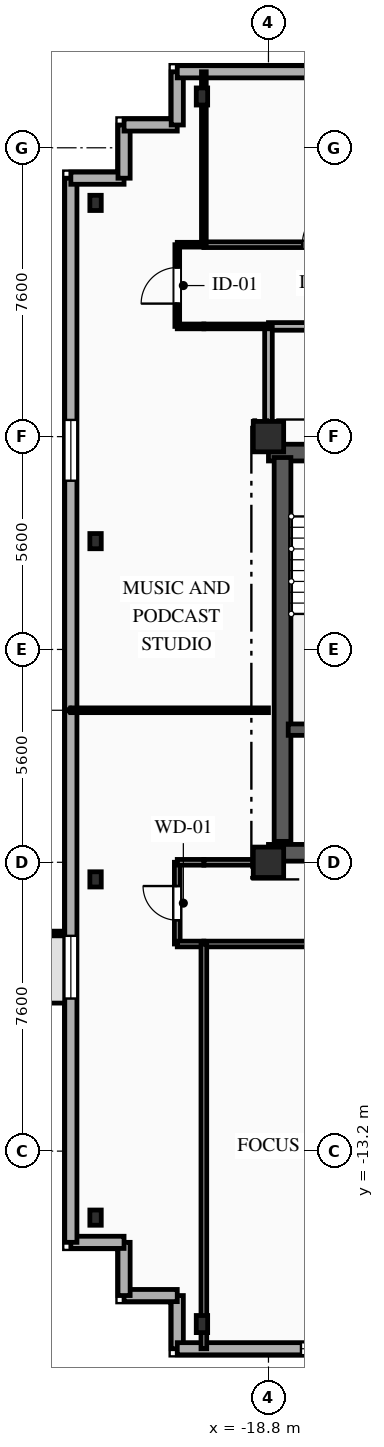
"""IFC4 building model, lengths in metres.
Left out: names, types, materials, properties, quantities, classifications, styles, units other than length and angle.
Written with IfcOpenShell. Run it as: python <this file> out.ifc"""

import sys

from ifc_helpers import new_model, si_unit, direction, frame, frame_2d, origin, origin_2d, place, context, subcontext, project, spatial, rectangle, i_section, extrude, element, fill, save


model = new_model("IFC4")
c1 = context("Model", 3, precision=1e-05, world=origin(), true_north=direction((0.0, 1.0)))
c2 = subcontext(c1, "Body", "Model", "MODEL_VIEW")
j1 = project(units=[si_unit("LENGTHUNIT", "METRE"), si_unit("PLANEANGLEUNIT", "RADIAN")], contexts=[c1])
p1 = place(None, origin())
s1 = spatial("IfcSite", under=j1, at=p1, CompositionType="ELEMENT")
p2 = place(p1, origin())
s2 = spatial("IfcBuilding", under=s1, at=p2, CompositionType="ELEMENT")
p3 = place(p2, frame((0.0, 0.0, 231.65)))
s3 = spatial("IfcBuildingStorey", under=s2, at=p3, CompositionType="ELEMENT", Elevation=231.65)
for number, where, z_axis, x_axis in (
    (1, (-18.8, -5.6, 0.0), (0.0, 0.0, 1.0), (1.0, 0.0, 0.0)),
    (2, (-18.8, 5.6, 0.0), (0.0, 0.0, 1.0), (1.0, 0.0, 0.0)),
):
    element("IfcColumn", number, at=place(p3, frame(where, z_axis=z_axis, x_axis=x_axis)), inside=s3, PredefinedType="COLUMN", context=c2, shape_type="SweptSolid", body=[
        extrude(rectangle(XDim=0.8, YDim=0.8, at=origin_2d()), origin(), (0.0, 0.0, 1.0), 3.35),
    ])
for number, where, z_axis, x_axis in (
    (3, (-20.55, -17.75, 0.0), (0.0, 0.0, 1.0), (1.0, 0.0, 0.0)),
    (4, (-20.55, 14.55, 0.0), (0.0, 0.0, 1.0), (1.0, 0.0, 0.0)),
):
    element("IfcColumn", number, at=place(p3, frame(where, z_axis=z_axis, x_axis=x_axis)), inside=s3, PredefinedType="COLUMN", context=c2, shape_type="SweptSolid", body=[
        extrude(i_section(OverallWidth=0.3, OverallDepth=0.45, WebThickness=0.014, FlangeThickness=0.026, FilletRadius=0.027, at=origin_2d()), origin(), (0.0, 0.0, 1.0), 3.35),
    ])
for number, where, z_axis, x_axis in (
    (5, (-23.35, 11.75, 0.0), (0.0, 0.0, 1.0), (1.0, 0.0, 0.0)),
    (6, (-23.35, 2.85, 0.0), (0.0, 0.0, 1.0), (1.0, 0.0, 0.0)),
    (7, (-23.35, -6.05, 0.0), (0.0, 0.0, 1.0), (1.0, 0.0, 0.0)),
    (8, (-23.35, -14.95, 0.0), (0.0, 0.0, 1.0), (1.0, 0.0, 0.0)),
):
    element("IfcColumn", number, at=place(p3, frame(where, z_axis=z_axis, x_axis=x_axis)), inside=s3, PredefinedType="COLUMN", context=c2, shape_type="SweptSolid", body=[
        extrude(i_section(OverallWidth=0.3, OverallDepth=0.4, WebThickness=0.013, FlangeThickness=0.024, FilletRadius=0.027, at=origin_2d()), origin(), (0.0, 0.0, 1.0), 3.35),
    ])
p4 = place(p3, frame((-21.2, -18.4, 0.0), z_axis=(0.0, 0.0, 1.0), x_axis=(0.0, 1.0, 0.0)))
e9 = element("IfcWall", 9, at=p4, inside=s3, PredefinedType="SOLIDWALL", context=c2, shape_type="SweptSolid", body=[
    extrude(rectangle(XDim=1.4, YDim=0.32, at=frame_2d((0.7, 0.0))), origin(), (0.0, 0.0, 1.0), 3.04),
])
p5 = place(p3, frame((-21.2, -17.0, 0.0), z_axis=(0.0, 0.0, 1.0), x_axis=(-1.0, 0.0, 0.0)))
e10 = element("IfcWall", 10, at=p5, inside=s3, PredefinedType="SOLIDWALL", context=c2, shape_type="SweptSolid", body=[
    extrude(rectangle(XDim=1.4, YDim=0.32, at=frame_2d((0.7, 0.0))), origin(), (0.0, 0.0, 1.0), 3.04),
])
for number, where, z_axis, x_axis in (
    (11, (-22.6, -17.0, 0.0), (0.0, 0.0, 1.0), (0.0, 1.0, 0.0)),
    (12, (-22.6, -15.6, 0.0), (0.0, 0.0, 1.0), (-1.0, 0.0, 0.0)),
):
    element("IfcWall", number, at=place(p3, frame(where, z_axis=z_axis, x_axis=x_axis)), inside=s3, PredefinedType="SOLIDWALL", context=c2, shape_type="SweptSolid", body=[
        extrude(rectangle(XDim=1.4, YDim=0.32, at=frame_2d((0.7, 0.0))), origin(), (0.0, 0.0, 1.0), 3.04),
    ])
p6 = place(p3, frame((-24.0, -15.6, 0.0), z_axis=(0.0, 0.0, 1.0), x_axis=(0.0, 1.0, 0.0)))
e13 = element("IfcWall", 13, at=p6, inside=s3, PredefinedType="SOLIDWALL", context=c2, shape_type="SweptSolid", body=[
    extrude(rectangle(XDim=28.0, YDim=0.32, at=frame_2d((14.0, 0.0))), origin(), (0.0, 0.0, 1.0), 3.04),
])
p7 = place(p6, frame((6.415, 0.0, 0.85)))
e14 = element("IfcOpeningElement", 14, at=p7, cuts=e13, PredefinedType="OPENING", context=c2, shape_type="SweptSolid", body=[
    extrude(rectangle(XDim=1.65, YDim=1.85, at=frame_2d((0.825, 0.925))), frame((0.0, 0.17, 0.0), z_axis=(0.0, -1.0, 0.0), x_axis=(1.0, 0.0, 0.0)), (0.0, 0.0, 1.0), 0.34),
])
p8 = place(p6, frame((20.04, 0.0, 0.85)))
e15 = element("IfcOpeningElement", 15, at=p8, cuts=e13, PredefinedType="OPENING", context=c2, shape_type="SweptSolid", body=[
    extrude(rectangle(XDim=1.6, YDim=1.85, at=frame_2d((0.8, 0.925))), frame((0.0, 0.17, 0.0), z_axis=(0.0, -1.0, 0.0), x_axis=(1.0, 0.0, 0.0)), (0.0, 0.0, 1.0), 0.34),
])
p9 = place(p3, frame((-24.0, 12.4, 0.0), z_axis=(0.0, 0.0, 1.0), x_axis=(1.0, 0.0, 0.0)))
e16 = element("IfcWall", 16, at=p9, inside=s3, PredefinedType="SOLIDWALL", context=c2, shape_type="SweptSolid", body=[
    extrude(rectangle(XDim=1.4, YDim=0.32, at=frame_2d((0.7, 0.0))), origin(), (0.0, 0.0, 1.0), 3.04),
])
for number, where, z_axis, x_axis in (
    (17, (-22.6, 12.4, 0.0), (0.0, 0.0, 1.0), (0.0, 1.0, 0.0)),
    (18, (-22.6, 13.8, 0.0), (0.0, 0.0, 1.0), (1.0, 0.0, 0.0)),
):
    element("IfcWall", number, at=place(p3, frame(where, z_axis=z_axis, x_axis=x_axis)), inside=s3, PredefinedType="SOLIDWALL", context=c2, shape_type="SweptSolid", body=[
        extrude(rectangle(XDim=1.4, YDim=0.32, at=frame_2d((0.7, 0.0))), origin(), (0.0, 0.0, 1.0), 3.04),
    ])
p10 = place(p3, frame((-21.2, 13.8, 0.0), z_axis=(0.0, 0.0, 1.0), x_axis=(0.0, 1.0, 0.0)))
e19 = element("IfcWall", 19, at=p10, inside=s3, PredefinedType="SOLIDWALL", context=c2, shape_type="SweptSolid", body=[
    extrude(rectangle(XDim=1.4, YDim=0.32, at=frame_2d((0.7, 0.0))), origin(), (0.0, 0.0, 1.0), 3.04),
])
p11 = place(p3, frame((-21.2, 15.2, 0.0), z_axis=(0.0, 0.0, 1.0), x_axis=(1.0, 0.0, 0.0)))
e20 = element("IfcWall", 20, at=p11, inside=s3, PredefinedType="SOLIDWALL", context=c2, shape_type="SweptSolid", body=[
    extrude(rectangle(XDim=42.0, YDim=0.32, at=frame_2d((21.0, 0.0))), origin(), (0.0, 0.0, 1.0), 3.04),
])
p12 = place(p11, frame((5.015, 0.0, 0.85)))
e21 = element("IfcOpeningElement", 21, at=p12, cuts=e20, PredefinedType="OPENING", context=c2, shape_type="SweptSolid", body=[
    extrude(rectangle(XDim=1.65, YDim=1.85, at=frame_2d((0.825, 0.925))), frame((0.0, 0.17, 0.0), z_axis=(0.0, -1.0, 0.0), x_axis=(1.0, 0.0, 0.0)), (0.0, 0.0, 1.0), 0.34),
])
p13 = place(p11, frame((16.48, 0.0, 0.85)))
e22 = element("IfcOpeningElement", 22, at=p13, cuts=e20, PredefinedType="OPENING", context=c2, shape_type="SweptSolid", body=[
    extrude(rectangle(XDim=1.6, YDim=1.85, at=frame_2d((0.8, 0.925))), frame((0.0, 0.17, 0.0), z_axis=(0.0, -1.0, 0.0), x_axis=(1.0, 0.0, 0.0)), (0.0, 0.0, 1.0), 0.34),
])
p14 = place(p11, frame((25.575, 0.0, 0.85)))
e23 = element("IfcOpeningElement", 23, at=p14, cuts=e20, PredefinedType="OPENING", context=c2, shape_type="SweptSolid", body=[
    extrude(rectangle(XDim=1.65, YDim=1.85, at=frame_2d((0.825, 0.925))), frame((0.0, 0.17, 0.0), z_axis=(0.0, -1.0, 0.0), x_axis=(1.0, 0.0, 0.0)), (0.0, 0.0, 1.0), 0.34),
])
p15 = place(p11, frame((35.735, 0.0, 0.85)))
e24 = element("IfcOpeningElement", 24, at=p15, cuts=e20, PredefinedType="OPENING", context=c2, shape_type="SweptSolid", body=[
    extrude(rectangle(XDim=1.65, YDim=1.85, at=frame_2d((0.825, 0.925))), frame((0.0, 0.17, 0.0), z_axis=(0.0, -1.0, 0.0), x_axis=(1.0, 0.0, 0.0)), (0.0, 0.0, 1.0), 0.34),
])
p16 = place(p3, frame((20.8, -18.4, 0.0), z_axis=(0.0, 0.0, 1.0), x_axis=(-1.0, 0.0, 0.0)))
e25 = element("IfcWall", 25, at=p16, inside=s3, PredefinedType="SOLIDWALL", context=c2, shape_type="SweptSolid", body=[
    extrude(rectangle(XDim=42.0, YDim=0.32, at=frame_2d((21.0, 0.0))), origin(), (0.0, 0.0, 1.0), 3.04),
])
p17 = place(p16, frame((3.015, 0.0, 0.85)))
e26 = element("IfcOpeningElement", 26, at=p17, cuts=e25, PredefinedType="OPENING", context=c2, shape_type="SweptSolid", body=[
    extrude(rectangle(XDim=1.65, YDim=1.85, at=frame_2d((0.825, 0.925))), frame((0.0, 0.17, 0.0), z_axis=(0.0, -1.0, 0.0), x_axis=(1.0, 0.0, 0.0)), (0.0, 0.0, 1.0), 0.34),
])
p18 = place(p16, frame((9.775, 0.0, 0.85)))
e27 = element("IfcOpeningElement", 27, at=p18, cuts=e25, PredefinedType="OPENING", context=c2, shape_type="SweptSolid", body=[
    extrude(rectangle(XDim=1.65, YDim=1.85, at=frame_2d((0.825, 0.925))), frame((0.0, 0.17, 0.0), z_axis=(0.0, -1.0, 0.0), x_axis=(1.0, 0.0, 0.0)), (0.0, 0.0, 1.0), 0.34),
])
p19 = place(p16, frame((19.74, 0.0, 0.85)))
e28 = element("IfcOpeningElement", 28, at=p19, cuts=e25, PredefinedType="OPENING", context=c2, shape_type="SweptSolid", body=[
    extrude(rectangle(XDim=2.2, YDim=1.85, at=frame_2d((1.1, 0.925))), frame((0.0, 0.17, 0.0), z_axis=(0.0, -1.0, 0.0), x_axis=(1.0, 0.0, 0.0)), (0.0, 0.0, 1.0), 0.34),
])
p20 = place(p16, frame((30.255, 0.0, 0.85)))
e29 = element("IfcOpeningElement", 29, at=p20, cuts=e25, PredefinedType="OPENING", context=c2, shape_type="SweptSolid", body=[
    extrude(rectangle(XDim=1.65, YDim=1.85, at=frame_2d((0.825, 0.925))), frame((0.0, 0.17, 0.0), z_axis=(0.0, -1.0, 0.0), x_axis=(1.0, 0.0, 0.0)), (0.0, 0.0, 1.0), 0.34),
])
p21 = place(p16, frame((37.095, 0.0, 0.85)))
e30 = element("IfcOpeningElement", 30, at=p21, cuts=e25, PredefinedType="OPENING", context=c2, shape_type="SweptSolid", body=[
    extrude(rectangle(XDim=1.65, YDim=1.85, at=frame_2d((0.825, 0.925))), frame((0.0, 0.17, 0.0), z_axis=(0.0, -1.0, 0.0), x_axis=(1.0, 0.0, 0.0)), (0.0, 0.0, 1.0), 0.34),
])
p22 = place(p3, frame((-18.8, 5.18, 0.0), z_axis=(0.0, 0.0, 1.0), x_axis=(1.0, 0.0, 0.0)))
e31 = element("IfcWall", 31, at=p22, inside=s3, PredefinedType="SHEAR", context=c2, shape_type="SweptSolid", body=[
    extrude(rectangle(XDim=9.6, YDim=0.44, at=frame_2d((4.8, 0.0))), origin(), (0.0, 0.0, 1.0), 3.04),
])
p23 = place(p22, frame((1.55, 0.0, 0.0)))
e32 = element("IfcOpeningElement", 32, at=p23, cuts=e31, PredefinedType="OPENING", context=c2, shape_type="SweptSolid", body=[
    extrude(rectangle(XDim=1.1, YDim=2.15, at=frame_2d((0.55, 1.075))), frame((0.0, 0.23, 0.0), z_axis=(0.0, -1.0, 0.0), x_axis=(1.0, 0.0, 0.0)), (0.0, 0.0, 1.0), 0.46),
])
p24 = place(p22, frame((4.775, 0.0, 0.0)))
e33 = element("IfcOpeningElement", 33, at=p24, cuts=e31, PredefinedType="OPENING", context=c2, shape_type="SweptSolid", body=[
    extrude(rectangle(XDim=1.05, YDim=2.1, at=frame_2d((0.525, 1.05))), frame((0.0, 0.23, 0.0), z_axis=(0.0, -1.0, 0.0), x_axis=(1.0, 0.0, 0.0)), (0.0, 0.0, 1.0), 0.46),
])
p25 = place(p3, frame((-18.8, -5.35, 0.0), z_axis=(0.0, 0.0, 1.0), x_axis=(1.0, 0.0, 0.0)))
e34 = element("IfcWall", 34, at=p25, inside=s3, PredefinedType="SHEAR", context=c2, shape_type="SweptSolid", body=[
    extrude(rectangle(XDim=9.6, YDim=0.44, at=frame_2d((4.8, 0.0))), origin(), (0.0, 0.0, 1.0), 3.04),
])
p26 = place(p25, frame((1.05, 0.0, 0.0)))
e35 = element("IfcOpeningElement", 35, at=p26, cuts=e34, PredefinedType="OPENING", context=c2, shape_type="SweptSolid", body=[
    extrude(rectangle(XDim=0.9, YDim=2.1, at=frame_2d((0.45, 1.05))), frame((0.0, 0.23, 0.0), z_axis=(0.0, -1.0, 0.0), x_axis=(1.0, 0.0, 0.0)), (0.0, 0.0, 1.0), 0.46),
])
p27 = place(p3, frame((-18.43, -5.05, 0.0), z_axis=(0.0, 0.0, 1.0), x_axis=(0.0, 1.0, 0.0)))
e36 = element("IfcWall", 36, at=p27, inside=s3, PredefinedType="SHEAR", context=c2, shape_type="SweptSolid", body=[
    extrude(rectangle(XDim=10.1, YDim=0.44, at=frame_2d((5.05, 0.0))), origin(), (0.0, 0.0, 1.0), 3.04),
])
p28 = place(p3, frame((-18.28, -2.11, 0.0), z_axis=(0.0, 0.0, 1.0), x_axis=(1.0, 0.0, 0.0)))
e37 = element("IfcWall", 37, at=p28, inside=s3, PredefinedType="SHEAR", context=c2, shape_type="SweptSolid", body=[
    extrude(rectangle(XDim=3.18, YDim=0.3, at=frame_2d((1.59, 0.0))), origin(), (0.0, 0.0, 1.0), 3.04),
])
p29 = place(p3, frame((-12.0, 8.5, 0.0), z_axis=(0.0, 0.0, 1.0), x_axis=(-1.0, 0.0, 0.0)))
e38 = element("IfcWall", 38, at=p29, inside=s3, PredefinedType="PARTITIONING", context=c2, shape_type="SweptSolid", body=[
    extrude(rectangle(XDim=6.8, YDim=0.2, at=frame_2d((3.4, 0.0))), origin(), (0.0, 0.0, 1.0), 3.04),
])
p30 = place(p29, frame((1.715, 0.0, 0.0)))
e39 = element("IfcOpeningElement", 39, at=p30, cuts=e38, PredefinedType="OPENING", context=c2, shape_type="SweptSolid", body=[
    extrude(rectangle(XDim=1.1, YDim=2.15, at=frame_2d((0.55, 1.075))), frame((0.0, 0.11, 0.0), z_axis=(0.0, -1.0, 0.0), x_axis=(1.0, 0.0, 0.0)), (0.0, 0.0, 1.0), 0.22),
])
p31 = place(p3, frame((-18.8, 8.5, 0.0), z_axis=(0.0, 0.0, 1.0), x_axis=(0.0, -1.0, 0.0)))
e40 = element("IfcWall", 40, at=p31, inside=s3, PredefinedType="PARTITIONING", context=c2, shape_type="SweptSolid", body=[
    extrude(rectangle(XDim=2.9, YDim=0.2, at=frame_2d((1.45, 0.0))), origin(), (0.0, 0.0, 1.0), 2.665),
])
p32 = place(p3, frame((-21.2, 8.5, 0.0), z_axis=(0.0, 0.0, 1.0), x_axis=(0.0, 1.0, 0.0)))
e41 = element("IfcWall", 41, at=p32, inside=s3, PredefinedType="PARTITIONING", context=c2, shape_type="SweptSolid", body=[
    extrude(rectangle(XDim=2.15, YDim=0.125, at=frame_2d((1.075, 0.0))), origin(), (0.0, 0.0, 1.0), 2.695),
])
p33 = place(p32, frame((0.6, 0.0, 0.0)))
e42 = element("IfcOpeningElement", 42, at=p33, cuts=e41, PredefinedType="OPENING", context=c2, shape_type="SweptSolid", body=[
    extrude(rectangle(XDim=0.95, YDim=2.1, at=frame_2d((0.475, 1.05))), frame((0.0, 0.073, 0.0), z_axis=(0.0, -1.0, 0.0), x_axis=(1.0, 0.0, 0.0)), (0.0, 0.0, 1.0), 0.145),
])
p34 = place(p3, frame((-18.8, 8.5, 0.0), z_axis=(0.0, 0.0, 1.0), x_axis=(-1.0, 0.0, 0.0)))
e43 = element("IfcWall", 43, at=p34, inside=s3, PredefinedType="PARTITIONING", context=c2, shape_type="SweptSolid", body=[
    extrude(rectangle(XDim=1.7, YDim=0.125, at=frame_2d((0.85, 0.0))), origin(), (0.0, 0.0, 1.0), 3.04),
])
for number, where, z_axis, x_axis in (
    (44, (-20.5, 8.5, 0.0), (0.0, 0.0, 1.0), (-1.0, 0.0, 0.0)),
    (45, (-21.2, 10.65, 0.0), (0.0, 0.0, 1.0), (1.0, 0.0, 0.0)),
):
    element("IfcWall", number, at=place(p3, frame(where, z_axis=z_axis, x_axis=x_axis)), inside=s3, PredefinedType="PARTITIONING", context=c2, shape_type="SweptSolid", body=[
        extrude(rectangle(XDim=0.7, YDim=0.125, at=frame_2d((0.35, 0.0))), origin(), (0.0, 0.0, 1.0), 3.04),
    ])
p35 = place(p3, frame((-20.5, 10.65, 0.0), z_axis=(0.0, 0.0, 1.0), x_axis=(1.0, 0.0, 0.0)))
e46 = element("IfcWall", 46, at=p35, inside=s3, PredefinedType="PARTITIONING", context=c2, shape_type="SweptSolid", body=[
    extrude(rectangle(XDim=10.25, YDim=0.15, at=frame_2d((5.125, 0.0))), origin(), (0.0, 0.0, 1.0), 3.04),
])
p36 = place(p35, frame((2.59, 0.0, 0.0)))
e47 = element("IfcOpeningElement", 47, at=p36, cuts=e46, PredefinedType="OPENING", context=c2, shape_type="SweptSolid", body=[
    extrude(rectangle(XDim=1.05, YDim=2.15, at=frame_2d((0.525, 1.075))), frame((0.0, 0.085, 0.0), z_axis=(0.0, -1.0, 0.0), x_axis=(1.0, 0.0, 0.0)), (0.0, 0.0, 1.0), 0.17),
])
p37 = place(p3, frame((-21.2, -7.75, 0.0), z_axis=(0.0, 0.0, 1.0), x_axis=(0.0, 1.0, 0.0)))
e48 = element("IfcWall", 48, at=p37, inside=s3, PredefinedType="PARTITIONING", context=c2, shape_type="SweptSolid", body=[
    extrude(rectangle(XDim=2.15, YDim=0.15, at=frame_2d((1.075, 0.0))), origin(), (0.0, 0.0, 1.0), 2.695),
])
p38 = place(p37, frame((0.625, 0.0, 0.0)))
e49 = element("IfcOpeningElement", 49, at=p38, cuts=e48, PredefinedType="OPENING", context=c2, shape_type="SweptSolid", body=[
    extrude(rectangle(XDim=0.9, YDim=2.1, at=frame_2d((0.45, 1.05))), frame((0.0, 0.085, 0.0), z_axis=(0.0, -1.0, 0.0), x_axis=(1.0, 0.0, 0.0)), (0.0, 0.0, 1.0), 0.17),
])
p39 = place(p3, frame((-20.5, -5.6, 0.0), z_axis=(0.0, 0.0, 1.0), x_axis=(1.0, 0.0, 0.0)))
e50 = element("IfcWall", 50, at=p39, inside=s3, PredefinedType="PARTITIONING", context=c2, shape_type="SweptSolid", body=[
    extrude(rectangle(XDim=1.7, YDim=0.15, at=frame_2d((0.85, 0.0))), origin(), (0.0, 0.0, 1.0), 3.04),
])
for number, where, z_axis, x_axis in (
    (51, (-20.5, -7.75, 0.0), (0.0, 0.0, 1.0), (-1.0, 0.0, 0.0)),
    (52, (-21.2, -5.6, 0.0), (0.0, 0.0, 1.0), (1.0, 0.0, 0.0)),
):
    element("IfcWall", number, at=place(p3, frame(where, z_axis=z_axis, x_axis=x_axis)), inside=s3, PredefinedType="PARTITIONING", context=c2, shape_type="SweptSolid", body=[
        extrude(rectangle(XDim=0.7, YDim=0.15, at=frame_2d((0.35, 0.0))), origin(), (0.0, 0.0, 1.0), 3.04),
    ])
p40 = place(p3, frame((-13.667, -7.75, 0.0), z_axis=(0.0, 0.0, 1.0), x_axis=(-1.0, 0.0, 0.0)))
e53 = element("IfcWall", 53, at=p40, inside=s3, PredefinedType="PARTITIONING", context=c2, shape_type="SweptSolid", body=[
    extrude(rectangle(XDim=6.833, YDim=0.15, at=frame_2d((3.417, 0.0))), origin(), (0.0, 0.0, 1.0), 3.04),
])
p41 = place(p40, frame((1.158, 0.0, 0.0)))
e54 = element("IfcOpeningElement", 54, at=p41, cuts=e53, PredefinedType="OPENING", context=c2, shape_type="SweptSolid", body=[
    extrude(rectangle(XDim=1.05, YDim=2.15, at=frame_2d((0.525, 1.075))), frame((0.0, 0.085, 0.0), z_axis=(0.0, -1.0, 0.0), x_axis=(1.0, 0.0, 0.0)), (0.0, 0.0, 1.0), 0.17),
])
p42 = place(p3, frame((-24.0, -1.6, 0.0), z_axis=(0.0, 0.0, 1.0), x_axis=(1.0, 0.0, 0.0)))
e55 = element("IfcWall", 55, at=p42, inside=s3, PredefinedType="PARTITIONING", context=c2, shape_type="SweptSolid", body=[
    extrude(rectangle(XDim=5.2, YDim=0.125, at=frame_2d((2.6, 0.0))), origin(), (0.0, 0.0, 1.0), 3.04),
])
p43 = place(p3, frame((-20.5, -7.75, 0.0), z_axis=(0.0, 0.0, 1.0), x_axis=(0.0, -1.0, 0.0)))
e56 = element("IfcWall", 56, at=p43, inside=s3, PredefinedType="PARTITIONING", context=c2, shape_type="SweptSolid", body=[
    extrude(rectangle(XDim=10.65, YDim=0.15, at=frame_2d((5.325, 0.0))), origin(), (0.0, 0.0, 1.0), 2.665),
])
p44 = place(p3, frame((-20.5, 15.2, 0.0), z_axis=(0.0, 0.0, 1.0), x_axis=(0.0, -1.0, 0.0)))
e57 = element("IfcWall", 57, at=p44, inside=s3, PredefinedType="PARTITIONING", context=c2, shape_type="SweptSolid", body=[
    extrude(rectangle(XDim=4.55, YDim=0.125, at=frame_2d((2.275, 0.0))), origin(), (0.0, 0.0, 1.0), 2.665),
])
p45 = place(p7, origin())
e58 = element("IfcWindow", 58, at=p45, inside=s3, PartitioningType="SINGLE_PANEL", PredefinedType="WINDOW", context=c2, shape_type="SweptSolid", body=[
    extrude(rectangle(XDim=1.65, YDim=1.85, at=frame_2d((0.825, 0.925))), frame((0.0, 0.03, 0.0), z_axis=(0.0, -1.0, 0.0), x_axis=(1.0, 0.0, 0.0)), (0.0, 0.0, 1.0), 0.06),
])
fill(e14, e58)
p46 = place(p8, origin())
e59 = element("IfcWindow", 59, at=p46, inside=s3, PartitioningType="SINGLE_PANEL", PredefinedType="WINDOW", context=c2, shape_type="SweptSolid", body=[
    extrude(rectangle(XDim=1.6, YDim=1.85, at=frame_2d((0.8, 0.925))), frame((0.0, 0.03, 0.0), z_axis=(0.0, -1.0, 0.0), x_axis=(1.0, 0.0, 0.0)), (0.0, 0.0, 1.0), 0.06),
])
fill(e15, e59)
p47 = place(p21, origin())
e60 = element("IfcWindow", 60, at=p47, inside=s3, PartitioningType="SINGLE_PANEL", PredefinedType="WINDOW", context=c2, shape_type="SweptSolid", body=[
    extrude(rectangle(XDim=1.65, YDim=1.85, at=frame_2d((0.825, 0.925))), frame((0.0, 0.03, 0.0), z_axis=(0.0, -1.0, 0.0), x_axis=(1.0, 0.0, 0.0)), (0.0, 0.0, 1.0), 0.06),
])
fill(e30, e60)
p48 = place(p33, origin())
e61 = element("IfcDoor", 61, at=p48, inside=s3, OperationType="SINGLE_SWING_LEFT", PredefinedType="DOOR", context=c2, shape_type="SweptSolid", body=[
    extrude(rectangle(XDim=0.95, YDim=2.1, at=frame_2d((0.475, 1.05))), frame((0.0, 0.025, 0.0), z_axis=(0.0, -1.0, 0.0), x_axis=(1.0, 0.0, 0.0)), (0.0, 0.0, 1.0), 0.05),
])
fill(e42, e61)
p49 = place(p36, origin())
e62 = element("IfcDoor", 62, at=p49, inside=s3, OperationType="SINGLE_SWING_RIGHT", PredefinedType="DOOR", context=c2, shape_type="SweptSolid", body=[
    extrude(rectangle(XDim=1.05, YDim=2.15, at=frame_2d((0.525, 1.075))), frame((0.0, 0.025, 0.0), z_axis=(0.0, -1.0, 0.0), x_axis=(1.0, 0.0, 0.0)), (0.0, 0.0, 1.0), 0.05),
])
fill(e47, e62)
p50 = place(p38, origin())
e63 = element("IfcDoor", 63, at=p50, inside=s3, OperationType="SINGLE_SWING_RIGHT", PredefinedType="DOOR", context=c2, shape_type="SweptSolid", body=[
    extrude(rectangle(XDim=0.9, YDim=2.1, at=frame_2d((0.45, 1.05))), frame((0.0, 0.025, 0.0), z_axis=(0.0, -1.0, 0.0), x_axis=(1.0, 0.0, 0.0)), (0.0, 0.0, 1.0), 0.05),
])
fill(e49, e63)
save(model, sys.argv[1])
